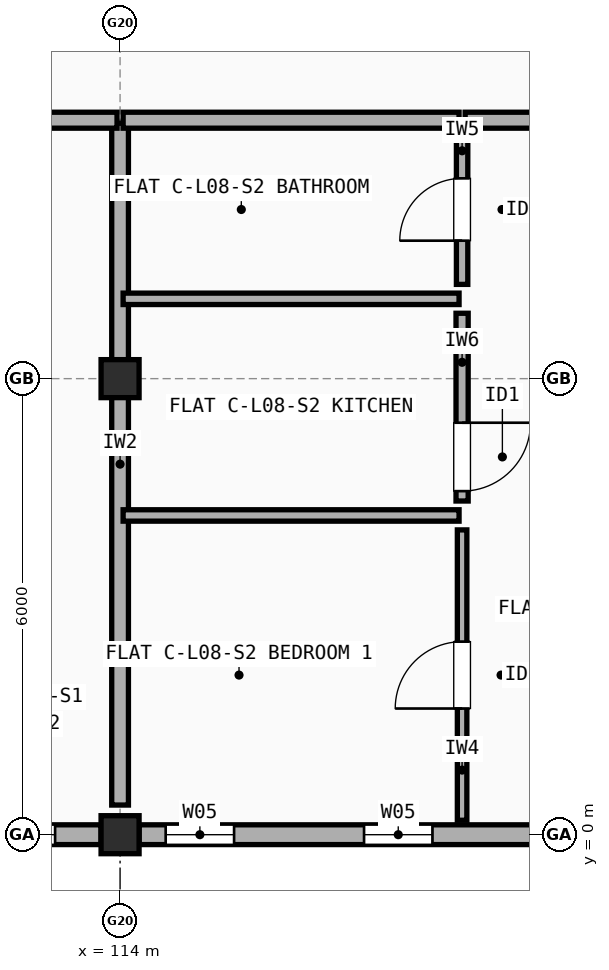
"""IFC4 building model, lengths in metres.
Left out: names, types, materials, properties, quantities, classifications, styles, units other than length and angle.
Written with IfcOpenShell. Run it as: python <this file> out.ifc"""

import sys

from ifc_helpers import new_model, si_unit, direction, frame, frame_2d, origin, origin_2d, place, context, subcontext, project, spatial, rectangle, extrude, element, fill, save


model = new_model("IFC4")
c1 = context("Model", 3, precision=1e-05, world=origin(), true_north=direction((0.0, 1.0)))
c2 = subcontext(c1, "Body", "Model", "MODEL_VIEW")
j1 = project(units=[si_unit("LENGTHUNIT", "METRE"), si_unit("PLANEANGLEUNIT", "RADIAN")], contexts=[c1])
p1 = place(None, origin())
s1 = spatial("IfcSite", under=j1, at=p1, CompositionType="ELEMENT")
p2 = place(p1, origin())
s2 = spatial("IfcBuilding", under=s1, at=p2, CompositionType="ELEMENT")
p3 = place(p2, frame((0.0, 0.0, 26.9)))
s3 = spatial("IfcBuildingStorey", under=s2, at=p3, CompositionType="ELEMENT", Elevation=26.9)
for number, where, z_axis, x_axis in (
    (1, (114.0, 0.0, 0.0), (0.0, 0.0, 1.0), (1.0, 0.0, 0.0)),
    (2, (114.0, 6.0, 0.0), (0.0, 0.0, 1.0), (1.0, 0.0, 0.0)),
):
    element("IfcColumn", number, at=place(p3, frame(where, z_axis=z_axis, x_axis=x_axis)), inside=s3, PredefinedType="COLUMN", context=c2, shape_type="SweptSolid", body=[
        extrude(rectangle(XDim=0.5, YDim=0.5, at=origin_2d()), origin(), (0.0, 0.0, 1.0), 2.98),
    ])
p4 = place(p3, frame((108.25, 0.0, 0.0), z_axis=(0.0, 0.0, 1.0), x_axis=(1.0, 0.0, 0.0)))
e3 = element("IfcWall", 3, at=p4, inside=s3, PredefinedType="STANDARD", context=c2, shape_type="SweptSolid", body=[
    extrude(rectangle(XDim=5.5, YDim=0.26, at=frame_2d((2.75, 0.0))), origin(), (0.0, 0.0, 1.0), 2.462),
])
p5 = place(p4, frame((0.755, 0.0, 0.9)))
e4 = element("IfcOpeningElement", 4, at=p5, cuts=e3, PredefinedType="OPENING", context=c2, shape_type="SweptSolid", body=[
    extrude(rectangle(XDim=1.2, YDim=1.35, at=frame_2d((0.6, 0.675))), frame((0.0, 0.14, 0.0), z_axis=(0.0, -1.0, 0.0), x_axis=(1.0, 0.0, 0.0)), (0.0, 0.0, 1.0), 0.28),
])
p6 = place(p4, frame((3.395, 0.0, 0.9)))
e5 = element("IfcOpeningElement", 5, at=p6, cuts=e3, PredefinedType="OPENING", context=c2, shape_type="SweptSolid", body=[
    extrude(rectangle(XDim=1.5, YDim=1.4, at=frame_2d((0.75, 0.7))), frame((0.0, 0.14, 0.0), z_axis=(0.0, -1.0, 0.0), x_axis=(1.0, 0.0, 0.0)), (0.0, 0.0, 1.0), 0.28),
])
p7 = place(p3, frame((114.25, 0.0, 0.0), z_axis=(0.0, 0.0, 1.0), x_axis=(1.0, 0.0, 0.0)))
e6 = element("IfcWall", 6, at=p7, inside=s3, PredefinedType="STANDARD", context=c2, shape_type="SweptSolid", body=[
    extrude(rectangle(XDim=5.5, YDim=0.26, at=frame_2d((2.75, 0.0))), origin(), (0.0, 0.0, 1.0), 2.462),
])
p8 = place(p7, frame((0.35, 0.0, 0.9)))
e7 = element("IfcOpeningElement", 7, at=p8, cuts=e6, PredefinedType="OPENING", context=c2, shape_type="SweptSolid", body=[
    extrude(rectangle(XDim=0.9, YDim=1.4, at=frame_2d((0.45, 0.7))), frame((0.0, 0.14, 0.0), z_axis=(0.0, -1.0, 0.0), x_axis=(1.0, 0.0, 0.0)), (0.0, 0.0, 1.0), 0.28),
])
p9 = place(p7, frame((2.96, 0.0, 0.9)))
e8 = element("IfcOpeningElement", 8, at=p9, cuts=e6, PredefinedType="OPENING", context=c2, shape_type="SweptSolid", body=[
    extrude(rectangle(XDim=0.9, YDim=1.4, at=frame_2d((0.45, 0.7))), frame((0.0, 0.14, 0.0), z_axis=(0.0, -1.0, 0.0), x_axis=(1.0, 0.0, 0.0)), (0.0, 0.0, 1.0), 0.28),
])
p10 = place(p3, frame((114.0, 0.39, 0.0), z_axis=(0.0, 0.0, 1.0), x_axis=(0.0, 1.0, 0.0)))
e9 = element("IfcWall", 9, at=p10, inside=s3, PredefinedType="SOLIDWALL", context=c2, shape_type="SweptSolid", body=[
    extrude(rectangle(XDim=8.97, YDim=0.22, at=frame_2d((4.485, 0.0))), origin(), (0.0, 0.0, 1.0), 2.458),
])
p11 = place(p3, frame((111.04, 9.4, 0.0), z_axis=(0.0, 0.0, 1.0), x_axis=(1.0, 0.0, 0.0)))
e10 = element("IfcWall", 10, at=p11, inside=s3, PredefinedType="SOLIDWALL", context=c2, shape_type="SweptSolid", body=[
    extrude(rectangle(XDim=2.92, YDim=0.21, at=frame_2d((1.46, 0.0))), origin(), (0.0, 0.0, 1.0), 2.548),
])
p12 = place(p3, frame((114.04, 9.4, 0.0), z_axis=(0.0, 0.0, 1.0), x_axis=(1.0, 0.0, 0.0)))
e11 = element("IfcWall", 11, at=p12, inside=s3, PredefinedType="SOLIDWALL", context=c2, shape_type="SweptSolid", body=[
    extrude(rectangle(XDim=4.42, YDim=0.21, at=frame_2d((2.21, 0.0))), origin(), (0.0, 0.0, 1.0), 2.548),
])
p13 = place(p3, frame((118.54, 9.4, 0.0), z_axis=(0.0, 0.0, 1.0), x_axis=(1.0, 0.0, 0.0)))
e12 = element("IfcWall", 12, at=p13, inside=s3, PredefinedType="SOLIDWALL", context=c2, shape_type="SweptSolid", body=[
    extrude(rectangle(XDim=4.42, YDim=0.21, at=frame_2d((2.21, 0.0))), origin(), (0.0, 0.0, 1.0), 2.508),
])
p14 = place(p13, frame((1.71, 0.0, 0.0)))
e13 = element("IfcOpeningElement", 13, at=p14, cuts=e12, PredefinedType="OPENING", context=c2, shape_type="SweptSolid", body=[
    extrude(rectangle(XDim=1.0, YDim=2.15, at=frame_2d((0.5, 1.075))), frame((0.0, 0.115, 0.0), z_axis=(0.0, -1.0, 0.0), x_axis=(1.0, 0.0, 0.0)), (0.0, 0.0, 1.0), 0.23),
])
p15 = place(p3, frame((118.5, 0.19, 0.0), z_axis=(0.0, 0.0, 1.0), x_axis=(0.0, 1.0, 0.0)))
e14 = element("IfcWall", 14, at=p15, inside=s3, PredefinedType="PARTITIONING", context=c2, shape_type="SweptSolid", body=[
    extrude(rectangle(XDim=3.82, YDim=0.125, at=frame_2d((1.91, 0.0))), origin(), (0.0, 0.0, 1.0), 2.98),
])
p16 = place(p15, frame((1.47, 0.0, 0.0)))
e15 = element("IfcOpeningElement", 15, at=p16, cuts=e14, PredefinedType="OPENING", context=c2, shape_type="SweptSolid", body=[
    extrude(rectangle(XDim=0.88, YDim=2.1, at=frame_2d((0.44, 1.05))), frame((0.0, 0.073, 0.0), z_axis=(0.0, -1.0, 0.0), x_axis=(1.0, 0.0, 0.0)), (0.0, 0.0, 1.0), 0.145),
])
p17 = place(p3, frame((118.5, 4.39, 0.0), z_axis=(0.0, 0.0, 1.0), x_axis=(0.0, 1.0, 0.0)))
e16 = element("IfcWall", 16, at=p17, inside=s3, PredefinedType="PLUMBINGWALL", context=c2, shape_type="SweptSolid", body=[
    extrude(rectangle(XDim=2.47, YDim=0.16, at=frame_2d((1.235, 0.0))), origin(), (0.0, 0.0, 1.0), 2.462),
])
p18 = place(p17, frame((0.13, 0.0, 0.0)))
e17 = element("IfcOpeningElement", 17, at=p18, cuts=e16, PredefinedType="OPENING", context=c2, shape_type="SweptSolid", body=[
    extrude(rectangle(XDim=0.9, YDim=2.1, at=frame_2d((0.45, 1.05))), frame((0.0, 0.09, 0.0), z_axis=(0.0, -1.0, 0.0), x_axis=(1.0, 0.0, 0.0)), (0.0, 0.0, 1.0), 0.18),
])
p19 = place(p3, frame((118.5, 7.24, 0.0), z_axis=(0.0, 0.0, 1.0), x_axis=(0.0, 1.0, 0.0)))
e18 = element("IfcWall", 18, at=p19, inside=s3, PredefinedType="PARTITIONING", context=c2, shape_type="SweptSolid", body=[
    extrude(rectangle(XDim=1.97, YDim=0.15, at=frame_2d((0.985, 0.0))), origin(), (0.0, 0.0, 1.0), 2.98),
])
p20 = place(p19, frame((0.575, 0.0, 0.0)))
e19 = element("IfcOpeningElement", 19, at=p20, cuts=e18, PredefinedType="OPENING", context=c2, shape_type="SweptSolid", body=[
    extrude(rectangle(XDim=0.82, YDim=2.08, at=frame_2d((0.41, 1.04))), frame((0.0, 0.085, 0.0), z_axis=(0.0, -1.0, 0.0), x_axis=(1.0, 0.0, 0.0)), (0.0, 0.0, 1.0), 0.17),
])
p21 = place(p3, frame((114.04, 4.2, 0.0), z_axis=(0.0, 0.0, 1.0), x_axis=(1.0, 0.0, 0.0)))
e20 = element("IfcWall", 20, at=p21, inside=s3, PredefinedType="PARTITIONING", context=c2, shape_type="SweptSolid", body=[
    extrude(rectangle(XDim=4.42, YDim=0.15, at=frame_2d((2.21, 0.0))), origin(), (0.0, 0.0, 1.0), 2.458),
])
p22 = place(p3, frame((114.04, 7.05, 0.0), z_axis=(0.0, 0.0, 1.0), x_axis=(1.0, 0.0, 0.0)))
e21 = element("IfcWall", 21, at=p22, inside=s3, PredefinedType="PARTITIONING", context=c2, shape_type="SweptSolid", body=[
    extrude(rectangle(XDim=4.42, YDim=0.15, at=frame_2d((2.21, 0.0))), origin(), (0.0, 0.0, 1.0), 2.548),
])
p23 = place(p6, origin())
e22 = element("IfcWindow", 22, at=p23, inside=s3, PartitioningType="SINGLE_PANEL", PredefinedType="WINDOW", context=c2, shape_type="SweptSolid", body=[
    extrude(rectangle(XDim=1.5, YDim=1.4, at=frame_2d((0.75, 0.7))), frame((0.0, 0.03, 0.0), z_axis=(0.0, -1.0, 0.0), x_axis=(1.0, 0.0, 0.0)), (0.0, 0.0, 1.0), 0.06),
])
fill(e5, e22)
p24 = place(p8, origin())
e23 = element("IfcWindow", 23, at=p24, inside=s3, PartitioningType="SINGLE_PANEL", PredefinedType="WINDOW", context=c2, shape_type="SweptSolid", body=[
    extrude(rectangle(XDim=0.9, YDim=1.4, at=frame_2d((0.45, 0.7))), frame((0.0, 0.03, 0.0), z_axis=(0.0, -1.0, 0.0), x_axis=(1.0, 0.0, 0.0)), (0.0, 0.0, 1.0), 0.06),
])
fill(e7, e23)
p25 = place(p9, origin())
e24 = element("IfcWindow", 24, at=p25, inside=s3, PartitioningType="SINGLE_PANEL", PredefinedType="WINDOW", context=c2, shape_type="SweptSolid", body=[
    extrude(rectangle(XDim=0.9, YDim=1.4, at=frame_2d((0.45, 0.7))), frame((0.0, 0.03, 0.0), z_axis=(0.0, -1.0, 0.0), x_axis=(1.0, 0.0, 0.0)), (0.0, 0.0, 1.0), 0.06),
])
fill(e8, e24)
p26 = place(p16, origin())
e25 = element("IfcDoor", 25, at=p26, inside=s3, OperationType="SINGLE_SWING_LEFT", PredefinedType="DOOR", context=c2, shape_type="SweptSolid", body=[
    extrude(rectangle(XDim=0.88, YDim=2.1, at=frame_2d((0.44, 1.05))), frame((0.0, 0.025, 0.0), z_axis=(0.0, -1.0, 0.0), x_axis=(1.0, 0.0, 0.0)), (0.0, 0.0, 1.0), 0.05),
])
fill(e15, e25)
p27 = place(p18, origin())
e26 = element("IfcDoor", 26, at=p27, inside=s3, OperationType="SINGLE_SWING_RIGHT", PredefinedType="DOOR", context=c2, shape_type="SweptSolid", body=[
    extrude(rectangle(XDim=0.9, YDim=2.1, at=frame_2d((0.45, 1.05))), frame((0.0, 0.025, 0.0), z_axis=(0.0, -1.0, 0.0), x_axis=(1.0, 0.0, 0.0)), (0.0, 0.0, 1.0), 0.05),
])
fill(e17, e26)
p28 = place(p20, origin())
e27 = element("IfcDoor", 27, at=p28, inside=s3, OperationType="SINGLE_SWING_LEFT", PredefinedType="DOOR", context=c2, shape_type="SweptSolid", body=[
    extrude(rectangle(XDim=0.82, YDim=2.08, at=frame_2d((0.41, 1.04))), frame((0.0, 0.025, 0.0), z_axis=(0.0, -1.0, 0.0), x_axis=(1.0, 0.0, 0.0)), (0.0, 0.0, 1.0), 0.05),
])
fill(e19, e27)
save(model, sys.argv[1])
